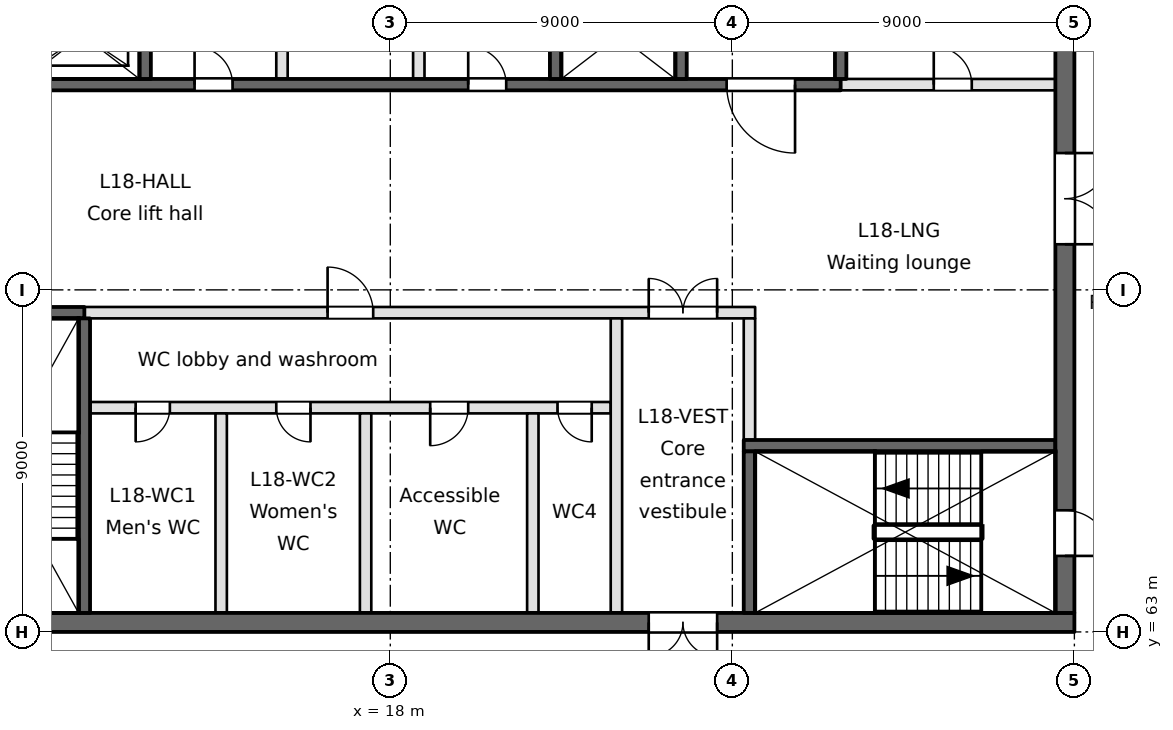
"""IFC4 building model, lengths in metres.
Left out: names, types, materials, properties, quantities, classifications, styles, units other than length and angle.
Written with IfcOpenShell. Run it as: python <this file> out.ifc"""

import sys

from ifc_helpers import new_model, si_unit, direction, frame, frame_2d, origin, place, context, subcontext, project, spatial, rectangle, extrude, element, fill, save


model = new_model("IFC4")
c1 = context("Model", 3, precision=1e-05, world=origin(), true_north=direction((0.0, 1.0)))
c2 = subcontext(c1, "Body", "Model", "MODEL_VIEW")
j1 = project(units=[si_unit("LENGTHUNIT", "METRE"), si_unit("PLANEANGLEUNIT", "RADIAN")], contexts=[c1])
p1 = place(None, origin())
s1 = spatial("IfcSite", under=j1, at=p1, CompositionType="ELEMENT")
p2 = place(p1, origin())
s2 = spatial("IfcBuilding", under=s1, at=p2, CompositionType="ELEMENT")
p3 = place(p2, frame((0.0, 0.0, 76.5)))
s3 = spatial("IfcBuildingStorey", under=s2, at=p3, CompositionType="ELEMENT", Elevation=76.5)
p4 = place(p3, frame((0.9, 63.25, -0.4), z_axis=(0.0, 0.0, 1.0), x_axis=(1.0, 0.0, 0.0)))
e1 = element("IfcWall", 1, at=p4, inside=s3, PredefinedType="SOLIDWALL", context=c2, shape_type="SweptSolid", body=[
    extrude(rectangle(XDim=35.1, YDim=0.5, at=frame_2d((17.55, 0.0))), origin(), (0.0, 0.0, 1.0), 3.65),
])
p5 = place(p4, frame((23.9, 0.0, 0.4)))
e2 = element("IfcOpeningElement", 2, at=p5, cuts=e1, PredefinedType="OPENING", context=c2, shape_type="SweptSolid", body=[
    extrude(rectangle(XDim=1.8, YDim=2.1, at=frame_2d((0.9, 1.05))), frame((0.0, 0.25, 0.0), z_axis=(0.0, -1.0, 0.0), x_axis=(1.0, 0.0, 0.0)), (0.0, 0.0, 1.0), 0.5),
])
p6 = place(p4, frame((1.55, 0.0, 0.4)))
e3 = element("IfcOpeningElement", 3, at=p6, cuts=e1, PredefinedType="OPENING", context=c2, shape_type="SweptSolid", body=[
    extrude(rectangle(XDim=1.2, YDim=2.1, at=frame_2d((0.6, 1.05))), frame((0.0, 0.25, 0.0), z_axis=(0.0, -1.0, 0.0), x_axis=(1.0, 0.0, 0.0)), (0.0, 0.0, 1.0), 0.5),
])
p7 = place(p4, frame((6.15, 0.0, 0.4)))
e4 = element("IfcOpeningElement", 4, at=p7, cuts=e1, PredefinedType="OPENING", context=c2, shape_type="SweptSolid", body=[
    extrude(rectangle(XDim=1.2, YDim=2.1, at=frame_2d((0.6, 1.05))), frame((0.0, 0.25, 0.0), z_axis=(0.0, -1.0, 0.0), x_axis=(1.0, 0.0, 0.0)), (0.0, 0.0, 1.0), 0.5),
])
p8 = place(p3, frame((27.3, 67.9, -0.4), z_axis=(0.0, 0.0, 1.0), x_axis=(1.0, 0.0, 0.0)))
e5 = element("IfcWall", 5, at=p8, inside=s3, PredefinedType="SOLIDWALL", context=c2, shape_type="SweptSolid", body=[
    extrude(rectangle(XDim=8.2, YDim=0.3, at=frame_2d((4.1, 0.0))), origin(), (0.0, 0.0, 1.0), 3.65),
])
p9 = place(p3, frame((10.1, 68.9, 0.0), z_axis=(0.0, 0.0, 1.0), x_axis=(1.0, 0.0, 0.0)))
e6 = element("IfcWall", 6, at=p9, inside=s3, PredefinedType="PARTITIONING", context=c2, shape_type="SweptSolid", body=[
    extrude(rectangle(XDim=13.7, YDim=0.3, at=frame_2d((6.85, 0.0))), origin(), (0.0, 0.0, 1.0), 3.25),
])
p10 = place(p9, frame((1.2, 0.0, 0.0)))
e7 = element("IfcOpeningElement", 7, at=p10, cuts=e6, PredefinedType="OPENING", context=c2, shape_type="SweptSolid", body=[
    extrude(rectangle(XDim=0.9, YDim=2.1, at=frame_2d((0.45, 1.05))), frame((0.0, 0.15, 0.0), z_axis=(0.0, -1.0, 0.0), x_axis=(1.0, 0.0, 0.0)), (0.0, 0.0, 1.0), 0.3),
])
p11 = place(p9, frame((4.9, 0.0, 0.0)))
e8 = element("IfcOpeningElement", 8, at=p11, cuts=e6, PredefinedType="OPENING", context=c2, shape_type="SweptSolid", body=[
    extrude(rectangle(XDim=0.9, YDim=2.1, at=frame_2d((0.45, 1.05))), frame((0.0, 0.15, 0.0), z_axis=(0.0, -1.0, 0.0), x_axis=(1.0, 0.0, 0.0)), (0.0, 0.0, 1.0), 0.3),
])
p12 = place(p9, frame((8.95, 0.0, 0.0)))
e9 = element("IfcOpeningElement", 9, at=p12, cuts=e6, PredefinedType="OPENING", context=c2, shape_type="SweptSolid", body=[
    extrude(rectangle(XDim=1.0, YDim=2.1, at=frame_2d((0.5, 1.05))), frame((0.0, 0.15, 0.0), z_axis=(0.0, -1.0, 0.0), x_axis=(1.0, 0.0, 0.0)), (0.0, 0.0, 1.0), 0.3),
])
p13 = place(p9, frame((12.3, 0.0, 0.0)))
e10 = element("IfcOpeningElement", 10, at=p13, cuts=e6, PredefinedType="OPENING", context=c2, shape_type="SweptSolid", body=[
    extrude(rectangle(XDim=0.9, YDim=2.1, at=frame_2d((0.45, 1.05))), frame((0.0, 0.15, 0.0), z_axis=(0.0, -1.0, 0.0), x_axis=(1.0, 0.0, 0.0)), (0.0, 0.0, 1.0), 0.3),
])
p14 = place(p3, frame((0.9, 71.4, -0.4), z_axis=(0.0, 0.0, 1.0), x_axis=(1.0, 0.0, 0.0)))
e11 = element("IfcWall", 11, at=p14, inside=s3, PredefinedType="SOLIDWALL", context=c2, shape_type="SweptSolid", body=[
    extrude(rectangle(XDim=9.05, YDim=0.3, at=frame_2d((4.525, 0.0))), origin(), (0.0, 0.0, 1.0), 3.65),
])
p15 = place(p3, frame((9.95, 71.4, 0.0), z_axis=(0.0, 0.0, 1.0), x_axis=(1.0, 0.0, 0.0)))
e12 = element("IfcWall", 12, at=p15, inside=s3, PredefinedType="PARTITIONING", context=c2, shape_type="SweptSolid", body=[
    extrude(rectangle(XDim=17.65, YDim=0.3, at=frame_2d((8.825, 0.0))), origin(), (0.0, 0.0, 1.0), 3.25),
])
p16 = place(p15, frame((14.85, 0.0, 0.0)))
e13 = element("IfcOpeningElement", 13, at=p16, cuts=e12, PredefinedType="OPENING", context=c2, shape_type="SweptSolid", body=[
    extrude(rectangle(XDim=1.8, YDim=2.1, at=frame_2d((0.9, 1.05))), frame((0.0, 0.15, 0.0), z_axis=(0.0, -1.0, 0.0), x_axis=(1.0, 0.0, 0.0)), (0.0, 0.0, 1.0), 0.3),
])
p17 = place(p15, frame((6.4, 0.0, 0.0)))
e14 = element("IfcOpeningElement", 14, at=p17, cuts=e12, PredefinedType="OPENING", context=c2, shape_type="SweptSolid", body=[
    extrude(rectangle(XDim=1.2, YDim=2.1, at=frame_2d((0.6, 1.05))), frame((0.0, 0.15, 0.0), z_axis=(0.0, -1.0, 0.0), x_axis=(1.0, 0.0, 0.0)), (0.0, 0.0, 1.0), 0.3),
])
p18 = place(p3, frame((0.9, 77.4, -0.4), z_axis=(0.0, 0.0, 1.0), x_axis=(1.0, 0.0, 0.0)))
e15 = element("IfcWall", 15, at=p18, inside=s3, PredefinedType="SOLIDWALL", context=c2, shape_type="SweptSolid", body=[
    extrude(rectangle(XDim=28.95, YDim=0.3, at=frame_2d((14.475, 0.0))), origin(), (0.0, 0.0, 1.0), 3.65),
])
p19 = place(p18, frame((4.35, 0.0, 0.4)))
e16 = element("IfcOpeningElement", 16, at=p19, cuts=e15, PredefinedType="OPENING", context=c2, shape_type="SweptSolid", body=[
    extrude(rectangle(XDim=1.8, YDim=2.1, at=frame_2d((0.9, 1.05))), frame((0.0, 0.15, 0.0), z_axis=(0.0, -1.0, 0.0), x_axis=(1.0, 0.0, 0.0)), (0.0, 0.0, 1.0), 0.3),
])
p20 = place(p18, frame((25.95, 0.0, 0.4)))
e17 = element("IfcOpeningElement", 17, at=p20, cuts=e15, PredefinedType="OPENING", context=c2, shape_type="SweptSolid", body=[
    extrude(rectangle(XDim=1.8, YDim=2.1, at=frame_2d((0.9, 1.05))), frame((0.0, 0.15, 0.0), z_axis=(0.0, -1.0, 0.0), x_axis=(1.0, 0.0, 0.0)), (0.0, 0.0, 1.0), 0.3),
])
p21 = place(p18, frame((11.95, 0.0, 0.4)))
e18 = element("IfcOpeningElement", 18, at=p21, cuts=e15, PredefinedType="OPENING", context=c2, shape_type="SweptSolid", body=[
    extrude(rectangle(XDim=1.0, YDim=2.1, at=frame_2d((0.5, 1.05))), frame((0.0, 0.15, 0.0), z_axis=(0.0, -1.0, 0.0), x_axis=(1.0, 0.0, 0.0)), (0.0, 0.0, 1.0), 0.3),
])
p22 = place(p18, frame((19.15, 0.0, 0.4)))
e19 = element("IfcOpeningElement", 19, at=p22, cuts=e15, PredefinedType="OPENING", context=c2, shape_type="SweptSolid", body=[
    extrude(rectangle(XDim=1.0, YDim=2.1, at=frame_2d((0.5, 1.05))), frame((0.0, 0.15, 0.0), z_axis=(0.0, -1.0, 0.0), x_axis=(1.0, 0.0, 0.0)), (0.0, 0.0, 1.0), 0.3),
])
p23 = place(p3, frame((29.85, 77.4, 0.0), z_axis=(0.0, 0.0, 1.0), x_axis=(1.0, 0.0, 0.0)))
e20 = element("IfcWall", 20, at=p23, inside=s3, PredefinedType="PARTITIONING", context=c2, shape_type="SweptSolid", body=[
    extrude(rectangle(XDim=5.65, YDim=0.3, at=frame_2d((2.825, 0.0))), origin(), (0.0, 0.0, 1.0), 3.25),
])
p24 = place(p23, frame((2.45, 0.0, 0.0)))
e21 = element("IfcOpeningElement", 21, at=p24, cuts=e20, PredefinedType="OPENING", context=c2, shape_type="SweptSolid", body=[
    extrude(rectangle(XDim=1.0, YDim=2.1, at=frame_2d((0.5, 1.05))), frame((0.0, 0.15, 0.0), z_axis=(0.0, -1.0, 0.0), x_axis=(1.0, 0.0, 0.0)), (0.0, 0.0, 1.0), 0.3),
])
p25 = place(p3, frame((9.95, 63.5, -0.4), z_axis=(0.0, 0.0, 1.0), x_axis=(0.0, 1.0, 0.0)))
e22 = element("IfcWall", 22, at=p25, inside=s3, PredefinedType="SOLIDWALL", context=c2, shape_type="SweptSolid", body=[
    extrude(rectangle(XDim=7.75, YDim=0.3, at=frame_2d((3.875, 0.0))), origin(), (0.0, 0.0, 1.0), 3.65),
])
p26 = place(p3, frame((11.55, 77.55, -0.4), z_axis=(0.0, 0.0, 1.0), x_axis=(0.0, 1.0, 0.0)))
e23 = element("IfcWall", 23, at=p26, inside=s3, PredefinedType="SOLIDWALL", context=c2, shape_type="SweptSolid", body=[
    extrude(rectangle(XDim=10.1, YDim=0.3, at=frame_2d((5.05, 0.0))), origin(), (0.0, 0.0, 1.0), 3.65),
])
p27 = place(p3, frame((13.55, 63.5, 0.0), z_axis=(0.0, 0.0, 1.0), x_axis=(0.0, 1.0, 0.0)))
e24 = element("IfcWall", 24, at=p27, inside=s3, PredefinedType="PARTITIONING", context=c2, shape_type="SweptSolid", body=[
    extrude(rectangle(XDim=5.25, YDim=0.3, at=frame_2d((2.625, 0.0))), origin(), (0.0, 0.0, 1.0), 3.25),
])
p28 = place(p3, frame((15.15, 77.55, 0.0), z_axis=(0.0, 0.0, 1.0), x_axis=(0.0, 1.0, 0.0)))
e25 = element("IfcWall", 25, at=p28, inside=s3, PredefinedType="PARTITIONING", context=c2, shape_type="SweptSolid", body=[
    extrude(rectangle(XDim=12.95, YDim=0.3, at=frame_2d((6.475, 0.0))), origin(), (0.0, 0.0, 1.0), 3.25),
])
p29 = place(p3, frame((17.35, 63.5, 0.0), z_axis=(0.0, 0.0, 1.0), x_axis=(0.0, 1.0, 0.0)))
e26 = element("IfcWall", 26, at=p29, inside=s3, PredefinedType="PARTITIONING", context=c2, shape_type="SweptSolid", body=[
    extrude(rectangle(XDim=5.25, YDim=0.3, at=frame_2d((2.625, 0.0))), origin(), (0.0, 0.0, 1.0), 3.25),
])
p30 = place(p3, frame((18.75, 77.55, 0.0), z_axis=(0.0, 0.0, 1.0), x_axis=(0.0, 1.0, 0.0)))
e27 = element("IfcWall", 27, at=p30, inside=s3, PredefinedType="PARTITIONING", context=c2, shape_type="SweptSolid", body=[
    extrude(rectangle(XDim=12.95, YDim=0.3, at=frame_2d((6.475, 0.0))), origin(), (0.0, 0.0, 1.0), 3.25),
])
p31 = place(p3, frame((21.75, 63.5, 0.0), z_axis=(0.0, 0.0, 1.0), x_axis=(0.0, 1.0, 0.0)))
e28 = element("IfcWall", 28, at=p31, inside=s3, PredefinedType="PARTITIONING", context=c2, shape_type="SweptSolid", body=[
    extrude(rectangle(XDim=5.25, YDim=0.3, at=frame_2d((2.625, 0.0))), origin(), (0.0, 0.0, 1.0), 3.25),
])
p32 = place(p3, frame((22.35, 77.55, -0.4), z_axis=(0.0, 0.0, 1.0), x_axis=(0.0, 1.0, 0.0)))
e29 = element("IfcWall", 29, at=p32, inside=s3, PredefinedType="SOLIDWALL", context=c2, shape_type="SweptSolid", body=[
    extrude(rectangle(XDim=10.1, YDim=0.3, at=frame_2d((5.05, 0.0))), origin(), (0.0, 0.0, 1.0), 3.65),
])
p33 = place(p3, frame((23.95, 63.5, 0.0), z_axis=(0.0, 0.0, 1.0), x_axis=(0.0, 1.0, 0.0)))
e30 = element("IfcWall", 30, at=p33, inside=s3, PredefinedType="PARTITIONING", context=c2, shape_type="SweptSolid", body=[
    extrude(rectangle(XDim=7.75, YDim=0.3, at=frame_2d((3.875, 0.0))), origin(), (0.0, 0.0, 1.0), 3.25),
])
p34 = place(p3, frame((25.65, 77.55, -0.4), z_axis=(0.0, 0.0, 1.0), x_axis=(0.0, 1.0, 0.0)))
e31 = element("IfcWall", 31, at=p34, inside=s3, PredefinedType="SOLIDWALL", context=c2, shape_type="SweptSolid", body=[
    extrude(rectangle(XDim=10.1, YDim=0.3, at=frame_2d((5.05, 0.0))), origin(), (0.0, 0.0, 1.0), 3.65),
])
p35 = place(p3, frame((27.45, 63.5, -0.4), z_axis=(0.0, 0.0, 1.0), x_axis=(0.0, 1.0, 0.0)))
e32 = element("IfcWall", 32, at=p35, inside=s3, PredefinedType="SOLIDWALL", context=c2, shape_type="SweptSolid", body=[
    extrude(rectangle(XDim=4.25, YDim=0.3, at=frame_2d((2.125, 0.0))), origin(), (0.0, 0.0, 1.0), 3.65),
])
p36 = place(p3, frame((27.45, 68.05, 0.0), z_axis=(0.0, 0.0, 1.0), x_axis=(0.0, 1.0, 0.0)))
e33 = element("IfcWall", 33, at=p36, inside=s3, PredefinedType="PARTITIONING", context=c2, shape_type="SweptSolid", body=[
    extrude(rectangle(XDim=3.2, YDim=0.3, at=frame_2d((1.6, 0.0))), origin(), (0.0, 0.0, 1.0), 3.25),
])
p37 = place(p3, frame((29.85, 77.55, -0.4), z_axis=(0.0, 0.0, 1.0), x_axis=(0.0, 1.0, 0.0)))
e34 = element("IfcWall", 34, at=p37, inside=s3, PredefinedType="SOLIDWALL", context=c2, shape_type="SweptSolid", body=[
    extrude(rectangle(XDim=10.1, YDim=0.3, at=frame_2d((5.05, 0.0))), origin(), (0.0, 0.0, 1.0), 3.65),
])
p38 = place(p3, frame((35.75, 63.5, -0.4), z_axis=(0.0, 0.0, 1.0), x_axis=(0.0, 1.0, 0.0)))
e35 = element("IfcWall", 35, at=p38, inside=s3, PredefinedType="SOLIDWALL", context=c2, shape_type="SweptSolid", body=[
    extrude(rectangle(XDim=34.6, YDim=0.5, at=frame_2d((17.3, 0.0))), origin(), (0.0, 0.0, 1.0), 3.65),
])
p39 = place(p38, frame((9.7, 0.0, 0.4)))
e36 = element("IfcOpeningElement", 36, at=p39, cuts=e35, PredefinedType="OPENING", context=c2, shape_type="SweptSolid", body=[
    extrude(rectangle(XDim=2.4, YDim=2.1, at=frame_2d((1.2, 1.05))), frame((0.0, 0.25, 0.0), z_axis=(0.0, -1.0, 0.0), x_axis=(1.0, 0.0, 0.0)), (0.0, 0.0, 1.0), 0.5),
])
p40 = place(p38, frame((27.9, 0.0, 0.4)))
e37 = element("IfcOpeningElement", 37, at=p40, cuts=e35, PredefinedType="OPENING", context=c2, shape_type="SweptSolid", body=[
    extrude(rectangle(XDim=1.5, YDim=2.1, at=frame_2d((0.75, 1.05))), frame((0.0, 0.25, 0.0), z_axis=(0.0, -1.0, 0.0), x_axis=(1.0, 0.0, 0.0)), (0.0, 0.0, 1.0), 0.5),
])
p41 = place(p38, frame((1.5, 0.0, 0.4)))
e38 = element("IfcOpeningElement", 38, at=p41, cuts=e35, PredefinedType="OPENING", context=c2, shape_type="SweptSolid", body=[
    extrude(rectangle(XDim=1.2, YDim=2.1, at=frame_2d((0.6, 1.05))), frame((0.0, 0.25, 0.0), z_axis=(0.0, -1.0, 0.0), x_axis=(1.0, 0.0, 0.0)), (0.0, 0.0, 1.0), 0.5),
])
p42 = place(p20, frame((1.8, 0.0, 0.0), z_axis=(0.0, 0.0, 1.0), x_axis=(-1.0, 0.0, 0.0)))
e39 = element("IfcDoor", 39, at=p42, inside=s3, OperationType="SINGLE_SWING_LEFT", PredefinedType="DOOR", context=c2, shape_type="SweptSolid", body=[
    extrude(rectangle(XDim=1.8, YDim=2.1, at=frame_2d((0.9, 1.05))), frame((0.0, 0.025, 0.0), z_axis=(0.0, -1.0, 0.0), x_axis=(1.0, 0.0, 0.0)), (0.0, 0.0, 1.0), 0.05),
])
fill(e17, e39)
p43 = place(p39, frame((2.4, 0.0, 0.0), z_axis=(0.0, 0.0, 1.0), x_axis=(-1.0, 0.0, 0.0)))
e40 = element("IfcDoor", 40, at=p43, inside=s3, OperationType="DOUBLE_DOOR_SINGLE_SWING", PredefinedType="DOOR", context=c2, shape_type="SweptSolid", body=[
    extrude(rectangle(XDim=2.4, YDim=2.1, at=frame_2d((1.2, 1.05))), frame((0.0, 0.025, 0.0), z_axis=(0.0, -1.0, 0.0), x_axis=(1.0, 0.0, 0.0)), (0.0, 0.0, 1.0), 0.05),
])
fill(e36, e40)
p44 = place(p5, frame((1.8, 0.0, 0.0), z_axis=(0.0, 0.0, 1.0), x_axis=(-1.0, 0.0, 0.0)))
e41 = element("IfcDoor", 41, at=p44, inside=s3, OperationType="DOUBLE_DOOR_SINGLE_SWING", PredefinedType="DOOR", context=c2, shape_type="SweptSolid", body=[
    extrude(rectangle(XDim=1.8, YDim=2.1, at=frame_2d((0.9, 1.05))), frame((0.0, 0.025, 0.0), z_axis=(0.0, -1.0, 0.0), x_axis=(1.0, 0.0, 0.0)), (0.0, 0.0, 1.0), 0.05),
])
fill(e2, e41)
p45 = place(p16, origin())
e42 = element("IfcDoor", 42, at=p45, inside=s3, OperationType="DOUBLE_DOOR_SINGLE_SWING", PredefinedType="DOOR", context=c2, shape_type="SweptSolid", body=[
    extrude(rectangle(XDim=1.8, YDim=2.1, at=frame_2d((0.9, 1.05))), frame((0.0, 0.025, 0.0), z_axis=(0.0, -1.0, 0.0), x_axis=(1.0, 0.0, 0.0)), (0.0, 0.0, 1.0), 0.05),
])
fill(e13, e42)
p46 = place(p10, frame((0.9, 0.0, 0.0), z_axis=(0.0, 0.0, 1.0), x_axis=(-1.0, 0.0, 0.0)))
e43 = element("IfcDoor", 43, at=p46, inside=s3, OperationType="SINGLE_SWING_RIGHT", PredefinedType="DOOR", context=c2, shape_type="SweptSolid", body=[
    extrude(rectangle(XDim=0.9, YDim=2.1, at=frame_2d((0.45, 1.05))), frame((0.0, 0.025, 0.0), z_axis=(0.0, -1.0, 0.0), x_axis=(1.0, 0.0, 0.0)), (0.0, 0.0, 1.0), 0.05),
])
fill(e7, e43)
p47 = place(p11, frame((0.9, 0.0, 0.0), z_axis=(0.0, 0.0, 1.0), x_axis=(-1.0, 0.0, 0.0)))
e44 = element("IfcDoor", 44, at=p47, inside=s3, OperationType="SINGLE_SWING_LEFT", PredefinedType="DOOR", context=c2, shape_type="SweptSolid", body=[
    extrude(rectangle(XDim=0.9, YDim=2.1, at=frame_2d((0.45, 1.05))), frame((0.0, 0.025, 0.0), z_axis=(0.0, -1.0, 0.0), x_axis=(1.0, 0.0, 0.0)), (0.0, 0.0, 1.0), 0.05),
])
fill(e8, e44)
p48 = place(p12, frame((1.0, 0.0, 0.0), z_axis=(0.0, 0.0, 1.0), x_axis=(-1.0, 0.0, 0.0)))
e45 = element("IfcDoor", 45, at=p48, inside=s3, OperationType="SINGLE_SWING_RIGHT", PredefinedType="DOOR", context=c2, shape_type="SweptSolid", body=[
    extrude(rectangle(XDim=1.0, YDim=2.1, at=frame_2d((0.5, 1.05))), frame((0.0, 0.025, 0.0), z_axis=(0.0, -1.0, 0.0), x_axis=(1.0, 0.0, 0.0)), (0.0, 0.0, 1.0), 0.05),
])
fill(e9, e45)
p49 = place(p13, frame((0.9, 0.0, 0.0), z_axis=(0.0, 0.0, 1.0), x_axis=(-1.0, 0.0, 0.0)))
e46 = element("IfcDoor", 46, at=p49, inside=s3, OperationType="SINGLE_SWING_LEFT", PredefinedType="DOOR", context=c2, shape_type="SweptSolid", body=[
    extrude(rectangle(XDim=0.9, YDim=2.1, at=frame_2d((0.45, 1.05))), frame((0.0, 0.025, 0.0), z_axis=(0.0, -1.0, 0.0), x_axis=(1.0, 0.0, 0.0)), (0.0, 0.0, 1.0), 0.05),
])
fill(e10, e46)
p50 = place(p17, origin())
e47 = element("IfcDoor", 47, at=p50, inside=s3, OperationType="SINGLE_SWING_LEFT", PredefinedType="DOOR", context=c2, shape_type="SweptSolid", body=[
    extrude(rectangle(XDim=1.2, YDim=2.1, at=frame_2d((0.6, 1.05))), frame((0.0, 0.025, 0.0), z_axis=(0.0, -1.0, 0.0), x_axis=(1.0, 0.0, 0.0)), (0.0, 0.0, 1.0), 0.05),
])
fill(e14, e47)
p51 = place(p41, frame((1.2, 0.0, 0.0), z_axis=(0.0, 0.0, 1.0), x_axis=(-1.0, 0.0, 0.0)))
e48 = element("IfcDoor", 48, at=p51, inside=s3, OperationType="SINGLE_SWING_RIGHT", PredefinedType="DOOR", context=c2, shape_type="SweptSolid", body=[
    extrude(rectangle(XDim=1.2, YDim=2.1, at=frame_2d((0.6, 1.05))), frame((0.0, 0.025, 0.0), z_axis=(0.0, -1.0, 0.0), x_axis=(1.0, 0.0, 0.0)), (0.0, 0.0, 1.0), 0.05),
])
fill(e38, e48)
p52 = place(p21, origin())
e49 = element("IfcDoor", 49, at=p52, inside=s3, OperationType="SINGLE_SWING_LEFT", PredefinedType="DOOR", context=c2, shape_type="SweptSolid", body=[
    extrude(rectangle(XDim=1.0, YDim=2.1, at=frame_2d((0.5, 1.05))), frame((0.0, 0.025, 0.0), z_axis=(0.0, -1.0, 0.0), x_axis=(1.0, 0.0, 0.0)), (0.0, 0.0, 1.0), 0.05),
])
fill(e18, e49)
p53 = place(p22, origin())
e50 = element("IfcDoor", 50, at=p53, inside=s3, OperationType="SINGLE_SWING_LEFT", PredefinedType="DOOR", context=c2, shape_type="SweptSolid", body=[
    extrude(rectangle(XDim=1.0, YDim=2.1, at=frame_2d((0.5, 1.05))), frame((0.0, 0.025, 0.0), z_axis=(0.0, -1.0, 0.0), x_axis=(1.0, 0.0, 0.0)), (0.0, 0.0, 1.0), 0.05),
])
fill(e19, e50)
p54 = place(p24, origin())
e51 = element("IfcDoor", 51, at=p54, inside=s3, OperationType="SINGLE_SWING_LEFT", PredefinedType="DOOR", context=c2, shape_type="SweptSolid", body=[
    extrude(rectangle(XDim=1.0, YDim=2.1, at=frame_2d((0.5, 1.05))), frame((0.0, 0.025, 0.0), z_axis=(0.0, -1.0, 0.0), x_axis=(1.0, 0.0, 0.0)), (0.0, 0.0, 1.0), 0.05),
])
fill(e21, e51)
save(model, sys.argv[1])
